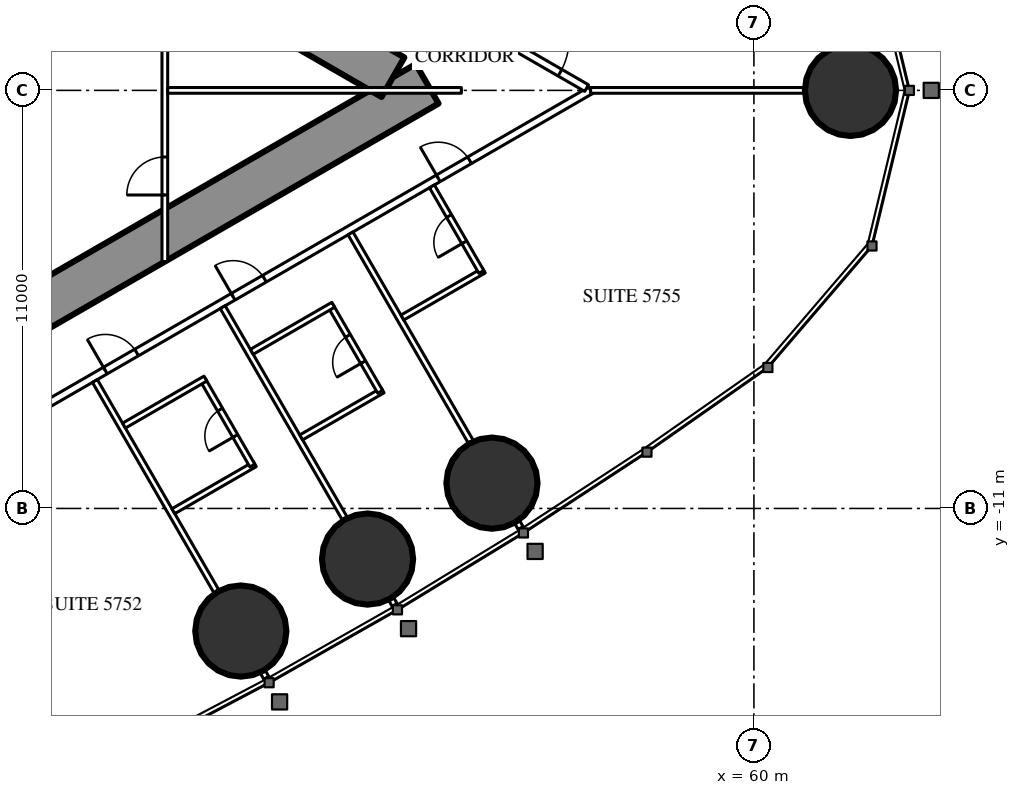
"""IFC4 building model, lengths in metres.
Left out: names, types, materials, properties, quantities, classifications, styles, units other than length and angle.
Written with IfcOpenShell. Run it as: python <this file> out.ifc"""

import sys

from ifc_helpers import new_model, si_unit, direction, frame, frame_2d, origin, origin_2d, place, context, subcontext, project, spatial, rectangle, circle, extrude, element, fill, save


model = new_model("IFC4")
c1 = context("Model", 3, precision=1e-05, world=origin(), true_north=direction((0.0, 1.0)))
c2 = subcontext(c1, "Body", "Model", "MODEL_VIEW")
j1 = project(units=[si_unit("LENGTHUNIT", "METRE"), si_unit("PLANEANGLEUNIT", "RADIAN")], contexts=[c1])
p1 = place(None, origin())
s1 = spatial("IfcSite", under=j1, at=p1, CompositionType="ELEMENT")
p2 = place(p1, origin())
s2 = spatial("IfcBuilding", under=s1, at=p2, CompositionType="ELEMENT")
p3 = place(p2, frame((0.0, 0.0, 215.3)))
s3 = spatial("IfcBuildingStorey", under=s2, at=p3, CompositionType="ELEMENT", Elevation=215.3)
for number, where, z_axis, x_axis in (
    (1, (62.542, 0.0, 0.0), (0.0, 0.0, 1.0), (1.0, 0.0, 0.0)),
    (2, (46.499, -14.226, 0.0), (0.0, 0.0, 1.0), (1.0, 0.0, 0.0)),
    (3, (49.834, -12.332, 0.0), (0.0, 0.0, 1.0), (1.0, 0.0, 0.0)),
    (4, (53.108, -10.334, 0.0), (0.0, 0.0, 1.0), (1.0, 0.0, 0.0)),
):
    element("IfcColumn", number, at=place(p3, frame(where, z_axis=z_axis, x_axis=x_axis)), inside=s3, PredefinedType="COLUMN", context=c2, shape_type="SweptSolid", body=[
        extrude(circle(Radius=1.2, at=origin_2d()), origin(), (0.0, 0.0, 1.0), 3.6),
    ])
p4 = place(p3, frame((27.2, -13.8, 0.0), z_axis=(0.0, 0.0, 1.0), x_axis=(0.866027159892, 0.499996958321, 0.0)))
e5 = element("IfcWall", 5, at=p4, inside=s3, PredefinedType="SHEAR", context=c2, shape_type="SweptSolid", body=[
    extrude(rectangle(XDim=27.947, YDim=1.2, at=frame_2d((13.973, 0.0))), origin(), (0.0, 0.0, 1.0), 3.6),
])
p5 = place(p4, frame((4.6, 0.0, 0.0)))
e6 = element("IfcOpeningElement", 6, at=p5, cuts=e5, PredefinedType="OPENING", context=c2, shape_type="SweptSolid", body=[
    extrude(rectangle(XDim=1.0, YDim=2.2, at=frame_2d((0.5, 1.1))), frame((0.0, 0.61, 0.0), z_axis=(0.0, -1.0, 0.0), x_axis=(1.0, 0.0, 0.0)), (0.0, 0.0, 1.0), 1.22),
])
p6 = place(p4, frame((13.395, 0.0, 0.0)))
e7 = element("IfcOpeningElement", 7, at=p6, cuts=e5, PredefinedType="OPENING", context=c2, shape_type="SweptSolid", body=[
    extrude(rectangle(XDim=1.8, YDim=2.2, at=frame_2d((0.9, 1.1))), frame((0.0, 0.61, 0.0), z_axis=(0.0, -1.0, 0.0), x_axis=(1.0, 0.0, 0.0)), (0.0, 0.0, 1.0), 1.22),
])
p7 = place(p3, frame((27.2, 13.8, 0.0), z_axis=(0.0, 0.0, 1.0), x_axis=(0.866024515034, -0.500001539357, 0.0)))
e8 = element("IfcWall", 8, at=p7, inside=s3, PredefinedType="SHEAR", context=c2, shape_type="SweptSolid", body=[
    extrude(rectangle(XDim=26.907, YDim=1.2, at=frame_2d((13.454, 0.0))), origin(), (0.0, 0.0, 1.0), 3.6),
])
p8 = place(p7, frame((4.6, 0.0, 0.0)))
e9 = element("IfcOpeningElement", 9, at=p8, cuts=e8, PredefinedType="OPENING", context=c2, shape_type="SweptSolid", body=[
    extrude(rectangle(XDim=1.0, YDim=2.2, at=frame_2d((0.5, 1.1))), frame((0.0, 0.61, 0.0), z_axis=(0.0, -1.0, 0.0), x_axis=(1.0, 0.0, 0.0)), (0.0, 0.0, 1.0), 1.22),
])
p9 = place(p7, frame((13.395, 0.0, 0.0)))
e10 = element("IfcOpeningElement", 10, at=p9, cuts=e8, PredefinedType="OPENING", context=c2, shape_type="SweptSolid", body=[
    extrude(rectangle(XDim=1.8, YDim=2.2, at=frame_2d((0.9, 1.1))), frame((0.0, 0.61, 0.0), z_axis=(0.0, -1.0, 0.0), x_axis=(1.0, 0.0, 0.0)), (0.0, 0.0, 1.0), 1.22),
])
p10 = place(p3, frame((28.959, -15.44, 0.0), z_axis=(0.0, 0.0, 1.0), x_axis=(0.866025227435, 0.500000305447, 0.0)))
e11 = element("IfcWall", 11, at=p10, inside=s3, PredefinedType="PARTITIONING", context=c2, shape_type="SweptSolid", body=[
    extrude(rectangle(XDim=30.88, YDim=0.2, at=frame_2d((15.44, 0.0))), origin(), (0.0, 0.0, 1.0), 3.35),
])
p11 = place(p10, frame((0.494, 0.0, 0.0)))
e12 = element("IfcOpeningElement", 12, at=p11, cuts=e11, PredefinedType="OPENING", context=c2, shape_type="SweptSolid", body=[
    extrude(rectangle(XDim=1.8, YDim=2.2, at=frame_2d((0.9, 1.1))), frame((0.0, 0.11, 0.0), z_axis=(0.0, -1.0, 0.0), x_axis=(1.0, 0.0, 0.0)), (0.0, 0.0, 1.0), 0.22),
])
p12 = place(p10, frame((7.687, 0.0, 0.0)))
e13 = element("IfcOpeningElement", 13, at=p12, cuts=e11, PredefinedType="OPENING", context=c2, shape_type="SweptSolid", body=[
    extrude(rectangle(XDim=1.0, YDim=2.2, at=frame_2d((0.5, 1.1))), frame((0.0, 0.11, 0.0), z_axis=(0.0, -1.0, 0.0), x_axis=(1.0, 0.0, 0.0)), (0.0, 0.0, 1.0), 0.22),
])
p13 = place(p10, frame((16.137, 0.0, 0.0)))
e14 = element("IfcOpeningElement", 14, at=p13, cuts=e11, PredefinedType="OPENING", context=c2, shape_type="SweptSolid", body=[
    extrude(rectangle(XDim=0.95, YDim=2.2, at=frame_2d((0.475, 1.1))), frame((0.0, 0.11, 0.0), z_axis=(0.0, -1.0, 0.0), x_axis=(1.0, 0.0, 0.0)), (0.0, 0.0, 1.0), 0.22),
])
p14 = place(p10, frame((20.021, 0.0, 0.0)))
e15 = element("IfcOpeningElement", 15, at=p14, cuts=e11, PredefinedType="OPENING", context=c2, shape_type="SweptSolid", body=[
    extrude(rectangle(XDim=0.95, YDim=2.2, at=frame_2d((0.475, 1.1))), frame((0.0, 0.11, 0.0), z_axis=(0.0, -1.0, 0.0), x_axis=(1.0, 0.0, 0.0)), (0.0, 0.0, 1.0), 0.22),
])
p15 = place(p10, frame((26.253, 0.0, 0.0)))
e16 = element("IfcOpeningElement", 16, at=p15, cuts=e11, PredefinedType="OPENING", context=c2, shape_type="SweptSolid", body=[
    extrude(rectangle(XDim=0.95, YDim=2.2, at=frame_2d((0.475, 1.1))), frame((0.0, 0.11, 0.0), z_axis=(0.0, -1.0, 0.0), x_axis=(1.0, 0.0, 0.0)), (0.0, 0.0, 1.0), 0.22),
])
p16 = place(p3, frame((42.66, -7.646, 0.0), z_axis=(0.0, 0.0, 1.0), x_axis=(0.499996592859, -0.866027370889, 0.0)))
e17 = element("IfcWall", 17, at=p16, inside=s3, PredefinedType="PARTITIONING", context=c2, shape_type="SweptSolid", body=[
    extrude(rectangle(XDim=6.398, YDim=0.15, at=frame_2d((3.199, 0.0))), origin(), (0.0, 0.0, 1.0), 2.45),
])
p17 = place(p3, frame((47.079, -15.3, 0.0), z_axis=(0.0, 0.0, 1.0), x_axis=(0.499212083968, -0.866479829667, 0.0)))
e18 = element("IfcWall", 18, at=p17, inside=s3, PredefinedType="PARTITIONING", context=c2, shape_type="SweptSolid", body=[
    extrude(rectangle(XDim=0.179, YDim=0.15, at=frame_2d((0.09, 0.0))), origin(), (0.0, 0.0, 1.0), 2.45),
])
p18 = place(p3, frame((46.023, -5.704, 0.0), z_axis=(0.0, 0.0, 1.0), x_axis=(0.499984478165, -0.866034365135, 0.0)))
e19 = element("IfcWall", 19, at=p18, inside=s3, PredefinedType="PARTITIONING", context=c2, shape_type="SweptSolid", body=[
    extrude(rectangle(XDim=6.426, YDim=0.15, at=frame_2d((3.213, 0.0))), origin(), (0.0, 0.0, 1.0), 2.45),
])
p19 = place(p3, frame((50.456, -13.382, 0.0), z_axis=(0.0, 0.0, 1.0), x_axis=(0.500661834965, -0.865642955848, 0.0)))
e20 = element("IfcWall", 20, at=p19, inside=s3, PredefinedType="PARTITIONING", context=c2, shape_type="SweptSolid", body=[
    extrude(rectangle(XDim=0.18, YDim=0.15, at=frame_2d((0.09, 0.0))), origin(), (0.0, 0.0, 1.0), 2.45),
])
p20 = place(p3, frame((49.385, -3.763, 0.0), z_axis=(0.0, 0.0, 1.0), x_axis=(0.499999447814, -0.866025722589, 0.0)))
e21 = element("IfcWall", 21, at=p20, inside=s3, PredefinedType="PARTITIONING", context=c2, shape_type="SweptSolid", body=[
    extrude(rectangle(XDim=6.333, YDim=0.15, at=frame_2d((3.166, 0.0))), origin(), (0.0, 0.0, 1.0), 2.45),
])
p21 = place(p3, frame((53.771, -11.36, 0.0), z_axis=(0.0, 0.0, 1.0), x_axis=(0.499524978789, -0.866299483762, 0.0)))
e22 = element("IfcWall", 22, at=p21, inside=s3, PredefinedType="PARTITIONING", context=c2, shape_type="SweptSolid", body=[
    extrude(rectangle(XDim=0.178, YDim=0.15, at=frame_2d((0.089, 0.0))), origin(), (0.0, 0.0, 1.0), 2.45),
])
p22 = place(p3, frame((55.702, 0.0, 0.0), z_axis=(0.0, 0.0, 1.0), x_axis=(1.0, 0.0, 0.0)))
e23 = element("IfcWall", 23, at=p22, inside=s3, PredefinedType="PARTITIONING", context=c2, shape_type="SweptSolid", body=[
    extrude(rectangle(XDim=5.619, YDim=0.15, at=frame_2d((2.81, 0.0))), origin(), (0.0, 0.0, 1.0), 2.45),
])
p23 = place(p3, frame((52.639, 1.769, 0.0), z_axis=(0.0, 0.0, 1.0), x_axis=(0.866027340901, -0.4999966448, 0.0)))
e24 = element("IfcWall", 24, at=p23, inside=s3, PredefinedType="PARTITIONING", context=c2, shape_type="SweptSolid", body=[
    extrude(rectangle(XDim=3.417, YDim=0.2, at=frame_2d((1.708, 0.0))), origin(), (0.0, 0.0, 1.0), 3.35),
])
p24 = place(p23, frame((0.809, 0.0, 0.0)))
e25 = element("IfcOpeningElement", 25, at=p24, cuts=e24, PredefinedType="OPENING", context=c2, shape_type="SweptSolid", body=[
    extrude(rectangle(XDim=1.8, YDim=2.2, at=frame_2d((0.9, 1.1))), frame((0.0, 0.11, 0.0), z_axis=(0.0, -1.0, 0.0), x_axis=(1.0, 0.0, 0.0)), (0.0, 0.0, 1.0), 0.22),
])
p25 = place(p3, frame((44.725, -11.072, 0.0), z_axis=(0.0, 0.0, 1.0), x_axis=(0.866006523861, 0.500032699561, 0.0)))
e26 = element("IfcWall", 26, at=p25, inside=s3, PredefinedType="PARTITIONING", context=c2, shape_type="SweptSolid", body=[
    extrude(rectangle(XDim=2.475, YDim=0.15, at=frame_2d((1.237, 0.0))), origin(), (0.0, 0.0, 1.0), 3.35),
])
p26 = place(p3, frame((45.503, -7.621, 0.0), z_axis=(0.0, 0.0, 1.0), x_axis=(0.500006934395, -0.866021400173, 0.0)))
e27 = element("IfcWall", 27, at=p26, inside=s3, PredefinedType="PARTITIONING", context=c2, shape_type="SweptSolid", body=[
    extrude(rectangle(XDim=2.6, YDim=0.15, at=frame_2d((1.3, 0.0))), origin(), (0.0, 0.0, 1.0), 3.35),
])
p27 = place(p26, frame((0.9, 0.0, 0.0)))
e28 = element("IfcOpeningElement", 28, at=p27, cuts=e27, PredefinedType="OPENING", context=c2, shape_type="SweptSolid", body=[
    extrude(rectangle(XDim=0.8, YDim=2.2, at=frame_2d((0.4, 1.1))), frame((0.0, 0.085, 0.0), z_axis=(0.0, -1.0, 0.0), x_axis=(1.0, 0.0, 0.0)), (0.0, 0.0, 1.0), 0.17),
])
for number, where, z_axis, x_axis in (
    (29, (43.425, -8.821, 0.0), (0.0, 0.0, 1.0), (0.866, 0.5, 0.0)),
    (30, (48.088, -9.13, 0.0), (0.0, 0.0, 1.0), (0.866, 0.5, 0.0)),
):
    element("IfcWall", number, at=place(p3, frame(where, z_axis=z_axis, x_axis=x_axis)), inside=s3, PredefinedType="PARTITIONING", context=c2, shape_type="SweptSolid", body=[
        extrude(rectangle(XDim=2.475, YDim=0.15, at=frame_2d((1.237, 0.0))), origin(), (0.0, 0.0, 1.0), 3.35),
    ])
p28 = place(p3, frame((48.866, -5.679, 0.0), z_axis=(0.0, 0.0, 1.0), x_axis=(0.500006934395, -0.866021400173, 0.0)))
e31 = element("IfcWall", 31, at=p28, inside=s3, PredefinedType="PARTITIONING", context=c2, shape_type="SweptSolid", body=[
    extrude(rectangle(XDim=2.6, YDim=0.15, at=frame_2d((1.3, 0.0))), origin(), (0.0, 0.0, 1.0), 3.35),
])
p29 = place(p28, frame((0.9, 0.0, 0.0)))
e32 = element("IfcOpeningElement", 32, at=p29, cuts=e31, PredefinedType="OPENING", context=c2, shape_type="SweptSolid", body=[
    extrude(rectangle(XDim=0.8, YDim=2.2, at=frame_2d((0.4, 1.1))), frame((0.0, 0.085, 0.0), z_axis=(0.0, -1.0, 0.0), x_axis=(1.0, 0.0, 0.0)), (0.0, 0.0, 1.0), 0.17),
])
p30 = place(p3, frame((46.788, -6.879, 0.0), z_axis=(0.0, 0.0, 1.0), x_axis=(0.866006523861, 0.500032699561, 0.0)))
e33 = element("IfcWall", 33, at=p30, inside=s3, PredefinedType="PARTITIONING", context=c2, shape_type="SweptSolid", body=[
    extrude(rectangle(XDim=2.475, YDim=0.15, at=frame_2d((1.237, 0.0))), origin(), (0.0, 0.0, 1.0), 3.35),
])
p31 = place(p3, frame((50.75, -5.977, 0.0), z_axis=(0.0, 0.0, 1.0), x_axis=(0.866031185235, 0.4999899861, 0.0)))
e34 = element("IfcWall", 34, at=p31, inside=s3, PredefinedType="PARTITIONING", context=c2, shape_type="SweptSolid", body=[
    extrude(rectangle(XDim=2.475, YDim=0.15, at=frame_2d((1.238, 0.0))), origin(), (0.0, 0.0, 1.0), 3.35),
])
p32 = place(p3, frame((51.529, -2.525, 0.0), z_axis=(0.0, 0.0, 1.0), x_axis=(0.500006934395, -0.866021400173, 0.0)))
e35 = element("IfcWall", 35, at=p32, inside=s3, PredefinedType="PARTITIONING", context=c2, shape_type="SweptSolid", body=[
    extrude(rectangle(XDim=2.6, YDim=0.15, at=frame_2d((1.3, 0.0))), origin(), (0.0, 0.0, 1.0), 3.35),
])
p33 = place(p32, frame((0.9, 0.0, 0.0)))
e36 = element("IfcOpeningElement", 36, at=p33, cuts=e35, PredefinedType="OPENING", context=c2, shape_type="SweptSolid", body=[
    extrude(rectangle(XDim=0.8, YDim=2.2, at=frame_2d((0.4, 1.1))), frame((0.0, 0.085, 0.0), z_axis=(0.0, -1.0, 0.0), x_axis=(1.0, 0.0, 0.0)), (0.0, 0.0, 1.0), 0.17),
])
p34 = place(p3, frame((44.5, -4.505, 0.0), z_axis=(0.0, 0.0, 1.0), x_axis=(0.0, 1.0, 0.0)))
e37 = element("IfcWall", 37, at=p34, inside=s3, PredefinedType="PARTITIONING", context=c2, shape_type="SweptSolid", body=[
    extrude(rectangle(XDim=9.009, YDim=0.15, at=frame_2d((4.505, 0.0))), origin(), (0.0, 0.0, 1.0), 3.35),
])
p35 = place(p34, frame((1.752, 0.0, 0.0)))
e38 = element("IfcOpeningElement", 38, at=p35, cuts=e37, PredefinedType="OPENING", context=c2, shape_type="SweptSolid", body=[
    extrude(rectangle(XDim=1.0, YDim=2.2, at=frame_2d((0.5, 1.1))), frame((0.0, 0.085, 0.0), z_axis=(0.0, -1.0, 0.0), x_axis=(1.0, 0.0, 0.0)), (0.0, 0.0, 1.0), 0.17),
])
p36 = place(p34, frame((6.257, 0.0, 0.0)))
e39 = element("IfcOpeningElement", 39, at=p36, cuts=e37, PredefinedType="OPENING", context=c2, shape_type="SweptSolid", body=[
    extrude(rectangle(XDim=1.0, YDim=2.2, at=frame_2d((0.5, 1.1))), frame((0.0, 0.085, 0.0), z_axis=(0.0, -1.0, 0.0), x_axis=(1.0, 0.0, 0.0)), (0.0, 0.0, 1.0), 0.17),
])
p37 = place(p3, frame((44.575, 0.0, 0.0), z_axis=(0.0, 0.0, 1.0), x_axis=(1.0, 0.0, 0.0)))
e40 = element("IfcWall", 40, at=p37, inside=s3, PredefinedType="PARTITIONING", context=c2, shape_type="SweptSolid", body=[
    extrude(rectangle(XDim=7.727, YDim=0.15, at=frame_2d((3.864, 0.0))), origin(), (0.0, 0.0, 1.0), 2.45),
])
p38 = place(p27, origin())
e41 = element("IfcDoor", 41, at=p38, inside=s3, OperationType="SINGLE_SWING_RIGHT", PredefinedType="DOOR", context=c2, shape_type="SweptSolid", body=[
    extrude(rectangle(XDim=0.8, YDim=2.2, at=frame_2d((0.4, 1.1))), frame((0.0, 0.025, 0.0), z_axis=(0.0, -1.0, 0.0), x_axis=(1.0, 0.0, 0.0)), (0.0, 0.0, 1.0), 0.05),
])
fill(e28, e41)
p39 = place(p13, origin())
e42 = element("IfcDoor", 42, at=p39, inside=s3, OperationType="SINGLE_SWING_LEFT", PredefinedType="DOOR", context=c2, shape_type="SweptSolid", body=[
    extrude(rectangle(XDim=0.95, YDim=2.2, at=frame_2d((0.475, 1.1))), frame((0.0, 0.025, 0.0), z_axis=(0.0, -1.0, 0.0), x_axis=(1.0, 0.0, 0.0)), (0.0, 0.0, 1.0), 0.05),
])
fill(e14, e42)
p40 = place(p29, origin())
e43 = element("IfcDoor", 43, at=p40, inside=s3, OperationType="SINGLE_SWING_RIGHT", PredefinedType="DOOR", context=c2, shape_type="SweptSolid", body=[
    extrude(rectangle(XDim=0.8, YDim=2.2, at=frame_2d((0.4, 1.1))), frame((0.0, 0.025, 0.0), z_axis=(0.0, -1.0, 0.0), x_axis=(1.0, 0.0, 0.0)), (0.0, 0.0, 1.0), 0.05),
])
fill(e32, e43)
p41 = place(p14, origin())
e44 = element("IfcDoor", 44, at=p41, inside=s3, OperationType="SINGLE_SWING_LEFT", PredefinedType="DOOR", context=c2, shape_type="SweptSolid", body=[
    extrude(rectangle(XDim=0.95, YDim=2.2, at=frame_2d((0.475, 1.1))), frame((0.0, 0.025, 0.0), z_axis=(0.0, -1.0, 0.0), x_axis=(1.0, 0.0, 0.0)), (0.0, 0.0, 1.0), 0.05),
])
fill(e15, e44)
p42 = place(p33, origin())
e45 = element("IfcDoor", 45, at=p42, inside=s3, OperationType="SINGLE_SWING_RIGHT", PredefinedType="DOOR", context=c2, shape_type="SweptSolid", body=[
    extrude(rectangle(XDim=0.8, YDim=2.2, at=frame_2d((0.4, 1.1))), frame((0.0, 0.025, 0.0), z_axis=(0.0, -1.0, 0.0), x_axis=(1.0, 0.0, 0.0)), (0.0, 0.0, 1.0), 0.05),
])
fill(e36, e45)
p43 = place(p15, origin())
e46 = element("IfcDoor", 46, at=p43, inside=s3, OperationType="SINGLE_SWING_LEFT", PredefinedType="DOOR", context=c2, shape_type="SweptSolid", body=[
    extrude(rectangle(XDim=0.95, YDim=2.2, at=frame_2d((0.475, 1.1))), frame((0.0, 0.025, 0.0), z_axis=(0.0, -1.0, 0.0), x_axis=(1.0, 0.0, 0.0)), (0.0, 0.0, 1.0), 0.05),
])
fill(e16, e46)
p44 = place(p24, origin())
e47 = element("IfcDoor", 47, at=p44, inside=s3, OperationType="DOUBLE_DOOR_SINGLE_SWING", PredefinedType="DOOR", context=c2, shape_type="SweptSolid", body=[
    extrude(rectangle(XDim=1.8, YDim=2.2, at=frame_2d((0.9, 1.1))), frame((0.0, 0.025, 0.0), z_axis=(0.0, -1.0, 0.0), x_axis=(1.0, 0.0, 0.0)), (0.0, 0.0, 1.0), 0.05),
])
fill(e25, e47)
p45 = place(p35, origin())
e48 = element("IfcDoor", 48, at=p45, inside=s3, OperationType="SINGLE_SWING_LEFT", PredefinedType="DOOR", context=c2, shape_type="SweptSolid", body=[
    extrude(rectangle(XDim=1.0, YDim=2.2, at=frame_2d((0.5, 1.1))), frame((0.0, 0.025, 0.0), z_axis=(0.0, -1.0, 0.0), x_axis=(1.0, 0.0, 0.0)), (0.0, 0.0, 1.0), 0.05),
])
fill(e38, e48)
save(model, sys.argv[1])
